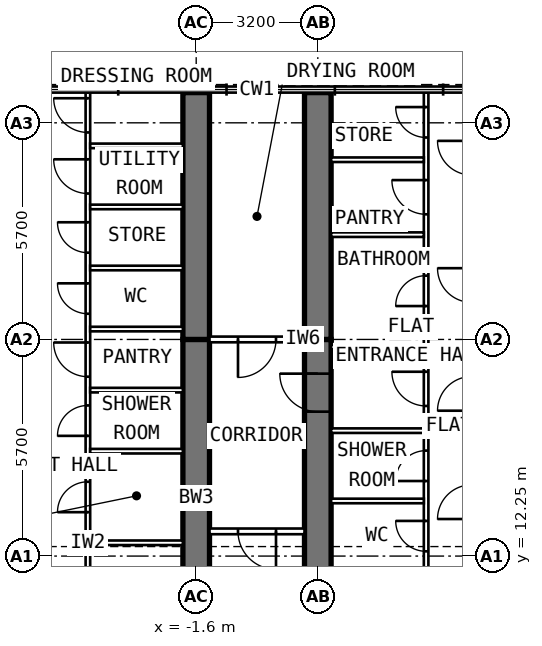
"""IFC4 building model, lengths in metres.
Left out: names, types, materials, properties, quantities, classifications, styles, units other than length and angle.
Written with IfcOpenShell. Run it as: python <this file> out.ifc"""

import sys

from ifc_helpers import new_model, si_unit, direction, frame, frame_2d, origin, place, context, subcontext, project, spatial, rectangle, extrude, element, fill, save


model = new_model("IFC4")
c1 = context("Model", 3, precision=1e-05, world=origin(), true_north=direction((0.0, 1.0)))
c2 = subcontext(c1, "Body", "Model", "MODEL_VIEW")
j1 = project(units=[si_unit("LENGTHUNIT", "METRE"), si_unit("PLANEANGLEUNIT", "RADIAN")], contexts=[c1])
p1 = place(None, origin())
s1 = spatial("IfcSite", under=j1, at=p1, CompositionType="ELEMENT")
p2 = place(p1, origin())
s2 = spatial("IfcBuilding", under=s1, at=p2, CompositionType="ELEMENT")
p3 = place(p2, frame((0.0, 0.0, 289.0)))
s3 = spatial("IfcBuildingStorey", under=s2, at=p3, CompositionType="ELEMENT", Elevation=289.0)
p4 = place(p3, frame((-1.6, 9.6, 0.0), z_axis=(0.0, 0.0, 1.0), x_axis=(0.0, 1.0, 0.0)))
e1 = element("IfcWall", 1, at=p4, inside=s3, PredefinedType="SHEAR", context=c2, shape_type="SweptSolid", body=[
    extrude(rectangle(XDim=8.35, YDim=0.7, at=frame_2d((4.175, 0.0))), origin(), (0.0, 0.0, 1.0), 3.6),
])
p5 = place(p4, frame((1.3, 0.0, 0.0)))
e2 = element("IfcOpeningElement", 2, at=p5, cuts=e1, PredefinedType="OPENING", context=c2, shape_type="SweptSolid", body=[
    extrude(rectangle(XDim=1.0, YDim=2.1, at=frame_2d((0.5, 1.05))), frame((0.0, 0.362, 0.0), z_axis=(0.0, -1.0, 0.0), x_axis=(1.0, 0.0, 0.0)), (0.0, 0.0, 1.0), 0.724),
])
p6 = place(p3, frame((-1.6, 17.95, 0.0), z_axis=(0.0, 0.0, 1.0), x_axis=(0.0, 1.0, 0.0)))
e3 = element("IfcWall", 3, at=p6, inside=s3, PredefinedType="SHEAR", context=c2, shape_type="SweptSolid", body=[
    extrude(rectangle(XDim=6.495, YDim=0.7, at=frame_2d((3.248, 0.0))), origin(), (0.0, 0.0, 1.0), 3.6),
])
p7 = place(p3, frame((1.6, 9.6, 0.0), z_axis=(0.0, 0.0, 1.0), x_axis=(0.0, 1.0, 0.0)))
e4 = element("IfcWall", 4, at=p7, inside=s3, PredefinedType="SHEAR", context=c2, shape_type="SweptSolid", body=[
    extrude(rectangle(XDim=8.35, YDim=0.7, at=frame_2d((4.175, 0.0))), origin(), (0.0, 0.0, 1.0), 3.6),
])
p8 = place(p7, frame((6.45, 0.0, 0.0)))
e5 = element("IfcOpeningElement", 5, at=p8, cuts=e4, PredefinedType="OPENING", context=c2, shape_type="SweptSolid", body=[
    extrude(rectangle(XDim=1.0, YDim=2.1, at=frame_2d((0.5, 1.05))), frame((0.0, 0.362, 0.0), z_axis=(0.0, -1.0, 0.0), x_axis=(1.0, 0.0, 0.0)), (0.0, 0.0, 1.0), 0.724),
])
p9 = place(p3, frame((1.6, 17.95, 0.0), z_axis=(0.0, 0.0, 1.0), x_axis=(0.0, 1.0, 0.0)))
e6 = element("IfcWall", 6, at=p9, inside=s3, PredefinedType="SHEAR", context=c2, shape_type="SweptSolid", body=[
    extrude(rectangle(XDim=6.495, YDim=0.7, at=frame_2d((3.248, 0.0))), origin(), (0.0, 0.0, 1.0), 3.6),
])
p10 = place(p3, frame((-4.45, 9.85, 0.0), z_axis=(0.0, 0.0, 1.0), x_axis=(0.0, 1.0, 0.0)))
e7 = element("IfcWall", 7, at=p10, inside=s3, PredefinedType="PARTITIONING", context=c2, shape_type="SweptSolid", body=[
    extrude(rectangle(XDim=14.595, YDim=0.12, at=frame_2d((7.297, 0.0))), origin(), (0.0, 0.0, 1.0), 3.35),
])
p11 = place(p10, frame((1.0, 0.0, 0.0)))
e8 = element("IfcOpeningElement", 8, at=p11, cuts=e7, PredefinedType="OPENING", context=c2, shape_type="SweptSolid", body=[
    extrude(rectangle(XDim=0.9, YDim=2.1, at=frame_2d((0.45, 1.05))), frame((0.0, 0.072, 0.0), z_axis=(0.0, -1.0, 0.0), x_axis=(1.0, 0.0, 0.0)), (0.0, 0.0, 1.0), 0.144),
])
p12 = place(p10, frame((3.555, 0.0, 0.0)))
e9 = element("IfcOpeningElement", 9, at=p12, cuts=e7, PredefinedType="OPENING", context=c2, shape_type="SweptSolid", body=[
    extrude(rectangle(XDim=0.8, YDim=2.1, at=frame_2d((0.4, 1.05))), frame((0.0, 0.072, 0.0), z_axis=(0.0, -1.0, 0.0), x_axis=(1.0, 0.0, 0.0)), (0.0, 0.0, 1.0), 0.144),
])
p13 = place(p10, frame((5.563, 0.0, 0.0)))
e10 = element("IfcOpeningElement", 10, at=p13, cuts=e7, PredefinedType="OPENING", context=c2, shape_type="SweptSolid", body=[
    extrude(rectangle(XDim=0.8, YDim=2.1, at=frame_2d((0.4, 1.05))), frame((0.0, 0.072, 0.0), z_axis=(0.0, -1.0, 0.0), x_axis=(1.0, 0.0, 0.0)), (0.0, 0.0, 1.0), 0.144),
])
p14 = place(p10, frame((7.12, 0.0, 0.0)))
e11 = element("IfcOpeningElement", 11, at=p14, cuts=e7, PredefinedType="OPENING", context=c2, shape_type="SweptSolid", body=[
    extrude(rectangle(XDim=0.9, YDim=2.1, at=frame_2d((0.45, 1.05))), frame((0.0, 0.072, 0.0), z_axis=(0.0, -1.0, 0.0), x_axis=(1.0, 0.0, 0.0)), (0.0, 0.0, 1.0), 0.144),
])
p15 = place(p10, frame((8.777, 0.0, 0.0)))
e12 = element("IfcOpeningElement", 12, at=p15, cuts=e7, PredefinedType="OPENING", context=c2, shape_type="SweptSolid", body=[
    extrude(rectangle(XDim=0.8, YDim=2.1, at=frame_2d((0.4, 1.05))), frame((0.0, 0.072, 0.0), z_axis=(0.0, -1.0, 0.0), x_axis=(1.0, 0.0, 0.0)), (0.0, 0.0, 1.0), 0.144),
])
p16 = place(p10, frame((10.383, 0.0, 0.0)))
e13 = element("IfcOpeningElement", 13, at=p16, cuts=e7, PredefinedType="OPENING", context=c2, shape_type="SweptSolid", body=[
    extrude(rectangle(XDim=0.8, YDim=2.1, at=frame_2d((0.4, 1.05))), frame((0.0, 0.072, 0.0), z_axis=(0.0, -1.0, 0.0), x_axis=(1.0, 0.0, 0.0)), (0.0, 0.0, 1.0), 0.144),
])
p17 = place(p10, frame((11.94, 0.0, 0.0)))
e14 = element("IfcOpeningElement", 14, at=p17, cuts=e7, PredefinedType="OPENING", context=c2, shape_type="SweptSolid", body=[
    extrude(rectangle(XDim=0.9, YDim=2.1, at=frame_2d((0.45, 1.05))), frame((0.0, 0.072, 0.0), z_axis=(0.0, -1.0, 0.0), x_axis=(1.0, 0.0, 0.0)), (0.0, 0.0, 1.0), 0.144),
])
p18 = place(p10, frame((13.547, 0.0, 0.0)))
e15 = element("IfcOpeningElement", 15, at=p18, cuts=e7, PredefinedType="OPENING", context=c2, shape_type="SweptSolid", body=[
    extrude(rectangle(XDim=0.9, YDim=2.1, at=frame_2d((0.45, 1.05))), frame((0.0, 0.072, 0.0), z_axis=(0.0, -1.0, 0.0), x_axis=(1.0, 0.0, 0.0)), (0.0, 0.0, 1.0), 0.144),
])
p19 = place(p3, frame((-1.95, 12.6, 0.0), z_axis=(0.0, 0.0, 1.0), x_axis=(-1.0, 0.0, 0.0)))
e16 = element("IfcWall", 16, at=p19, inside=s3, PredefinedType="PARTITIONING", context=c2, shape_type="SweptSolid", body=[
    extrude(rectangle(XDim=2.44, YDim=0.12, at=frame_2d((1.22, 0.0))), origin(), (0.0, 0.0, 1.0), 2.45),
])
for number, where, z_axis, x_axis in (
    (17, (-1.95, 15.01, 0.0), (0.0, 0.0, 1.0), (-1.0, 0.0, 0.0)),
    (18, (-1.95, 16.617, 0.0), (0.0, 0.0, 1.0), (-1.0, 0.0, 0.0)),
):
    element("IfcWall", number, at=place(p3, frame(where, z_axis=z_axis, x_axis=x_axis)), inside=s3, PredefinedType="PARTITIONING", context=c2, shape_type="SweptSolid", body=[
        extrude(rectangle(XDim=2.44, YDim=0.12, at=frame_2d((1.22, 0.0))), origin(), (0.0, 0.0, 1.0), 3.35),
    ])
p20 = place(p3, frame((-1.95, 18.223, 0.0), z_axis=(0.0, 0.0, 1.0), x_axis=(-1.0, 0.0, 0.0)))
e19 = element("IfcWall", 19, at=p20, inside=s3, PredefinedType="PARTITIONING", context=c2, shape_type="SweptSolid", body=[
    extrude(rectangle(XDim=2.44, YDim=0.12, at=frame_2d((1.22, 0.0))), origin(), (0.0, 0.0, 1.0), 2.45),
])
for number, where, z_axis, x_axis in (
    (20, (-1.95, 19.83, 0.0), (0.0, 0.0, 1.0), (-1.0, 0.0, 0.0)),
    (21, (-1.95, 21.437, 0.0), (0.0, 0.0, 1.0), (-1.0, 0.0, 0.0)),
    (22, (-1.95, 23.043, 0.0), (0.0, 0.0, 1.0), (-1.0, 0.0, 0.0)),
):
    element("IfcWall", number, at=place(p3, frame(where, z_axis=z_axis, x_axis=x_axis)), inside=s3, PredefinedType="PARTITIONING", context=c2, shape_type="SweptSolid", body=[
        extrude(rectangle(XDim=2.44, YDim=0.12, at=frame_2d((1.22, 0.0))), origin(), (0.0, 0.0, 1.0), 3.35),
    ])
p21 = place(p3, frame((4.45, 9.85, 0.0), z_axis=(0.0, 0.0, 1.0), x_axis=(0.0, 1.0, 0.0)))
e23 = element("IfcWall", 23, at=p21, inside=s3, PredefinedType="PARTITIONING", context=c2, shape_type="SweptSolid", body=[
    extrude(rectangle(XDim=14.595, YDim=0.12, at=frame_2d((7.297, 0.0))), origin(), (0.0, 0.0, 1.0), 3.35),
])
p22 = place(p21, frame((0.625, 0.0, 0.0)))
e24 = element("IfcOpeningElement", 24, at=p22, cuts=e23, PredefinedType="OPENING", context=c2, shape_type="SweptSolid", body=[
    extrude(rectangle(XDim=0.9, YDim=2.1, at=frame_2d((0.45, 1.05))), frame((0.0, 0.072, 0.0), z_axis=(0.0, -1.0, 0.0), x_axis=(1.0, 0.0, 0.0)), (0.0, 0.0, 1.0), 0.144),
])
p23 = place(p21, frame((2.525, 0.0, 0.0)))
e25 = element("IfcOpeningElement", 25, at=p23, cuts=e23, PredefinedType="OPENING", context=c2, shape_type="SweptSolid", body=[
    extrude(rectangle(XDim=0.8, YDim=2.1, at=frame_2d((0.4, 1.05))), frame((0.0, 0.072, 0.0), z_axis=(0.0, -1.0, 0.0), x_axis=(1.0, 0.0, 0.0)), (0.0, 0.0, 1.0), 0.144),
])
p24 = place(p21, frame((4.375, 0.0, 0.0)))
e26 = element("IfcOpeningElement", 26, at=p24, cuts=e23, PredefinedType="OPENING", context=c2, shape_type="SweptSolid", body=[
    extrude(rectangle(XDim=0.8, YDim=2.1, at=frame_2d((0.4, 1.05))), frame((0.0, 0.072, 0.0), z_axis=(0.0, -1.0, 0.0), x_axis=(1.0, 0.0, 0.0)), (0.0, 0.0, 1.0), 0.144),
])
p25 = place(p21, frame((6.35, 0.0, 0.0)))
e27 = element("IfcOpeningElement", 27, at=p25, cuts=e23, PredefinedType="OPENING", context=c2, shape_type="SweptSolid", body=[
    extrude(rectangle(XDim=0.9, YDim=2.1, at=frame_2d((0.45, 1.05))), frame((0.0, 0.072, 0.0), z_axis=(0.0, -1.0, 0.0), x_axis=(1.0, 0.0, 0.0)), (0.0, 0.0, 1.0), 0.144),
])
p26 = place(p21, frame((8.979, 0.0, 0.0)))
e28 = element("IfcOpeningElement", 28, at=p26, cuts=e23, PredefinedType="OPENING", context=c2, shape_type="SweptSolid", body=[
    extrude(rectangle(XDim=0.8, YDim=2.1, at=frame_2d((0.4, 1.05))), frame((0.0, 0.072, 0.0), z_axis=(0.0, -1.0, 0.0), x_axis=(1.0, 0.0, 0.0)), (0.0, 0.0, 1.0), 0.144),
])
p27 = place(p21, frame((11.393, 0.0, 0.0)))
e29 = element("IfcOpeningElement", 29, at=p27, cuts=e23, PredefinedType="OPENING", context=c2, shape_type="SweptSolid", body=[
    extrude(rectangle(XDim=0.9, YDim=2.1, at=frame_2d((0.45, 1.05))), frame((0.0, 0.072, 0.0), z_axis=(0.0, -1.0, 0.0), x_axis=(1.0, 0.0, 0.0)), (0.0, 0.0, 1.0), 0.144),
])
p28 = place(p21, frame((13.414, 0.0, 0.0)))
e30 = element("IfcOpeningElement", 30, at=p28, cuts=e23, PredefinedType="OPENING", context=c2, shape_type="SweptSolid", body=[
    extrude(rectangle(XDim=0.8, YDim=2.1, at=frame_2d((0.4, 1.05))), frame((0.0, 0.072, 0.0), z_axis=(0.0, -1.0, 0.0), x_axis=(1.0, 0.0, 0.0)), (0.0, 0.0, 1.0), 0.144),
])
for number, where, z_axis, x_axis in (
    (31, (1.95, 13.7, 0.0), (0.0, 0.0, 1.0), (1.0, 0.0, 0.0)),
    (32, (1.95, 15.55, 0.0), (0.0, 0.0, 1.0), (1.0, 0.0, 0.0)),
):
    element("IfcWall", number, at=place(p3, frame(where, z_axis=z_axis, x_axis=x_axis)), inside=s3, PredefinedType="PARTITIONING", context=c2, shape_type="SweptSolid", body=[
        extrude(rectangle(XDim=2.44, YDim=0.12, at=frame_2d((1.22, 0.0))), origin(), (0.0, 0.0, 1.0), 3.35),
    ])
p29 = place(p3, frame((1.95, 17.75, 0.0), z_axis=(0.0, 0.0, 1.0), x_axis=(1.0, 0.0, 0.0)))
e33 = element("IfcWall", 33, at=p29, inside=s3, PredefinedType="PARTITIONING", context=c2, shape_type="SweptSolid", body=[
    extrude(rectangle(XDim=2.44, YDim=0.12, at=frame_2d((1.22, 0.0))), origin(), (0.0, 0.0, 1.0), 2.45),
])
for number, where, z_axis, x_axis in (
    (34, (1.95, 20.707, 0.0), (0.0, 0.0, 1.0), (1.0, 0.0, 0.0)),
    (35, (1.95, 22.678, 0.0), (0.0, 0.0, 1.0), (1.0, 0.0, 0.0)),
):
    element("IfcWall", number, at=place(p3, frame(where, z_axis=z_axis, x_axis=x_axis)), inside=s3, PredefinedType="PARTITIONING", context=c2, shape_type="SweptSolid", body=[
        extrude(rectangle(XDim=2.44, YDim=0.12, at=frame_2d((1.22, 0.0))), origin(), (0.0, 0.0, 1.0), 3.35),
    ])
p30 = place(p3, frame((1.25, 17.95, 0.0), z_axis=(0.0, 0.0, 1.0), x_axis=(-1.0, 0.0, 0.0)))
e36 = element("IfcWall", 36, at=p30, inside=s3, PredefinedType="PARTITIONING", context=c2, shape_type="SweptSolid", body=[
    extrude(rectangle(XDim=2.5, YDim=0.15, at=frame_2d((1.25, 0.0))), origin(), (0.0, 0.0, 1.0), 3.35),
])
p31 = place(p30, frame((0.75, 0.0, 0.0)))
e37 = element("IfcOpeningElement", 37, at=p31, cuts=e36, PredefinedType="OPENING", context=c2, shape_type="SweptSolid", body=[
    extrude(rectangle(XDim=1.0, YDim=2.1, at=frame_2d((0.5, 1.05))), frame((0.0, 0.087, 0.0), z_axis=(0.0, -1.0, 0.0), x_axis=(1.0, 0.0, 0.0)), (0.0, 0.0, 1.0), 0.174),
])
p32 = place(p3, frame((1.25, 12.9, 0.0), z_axis=(0.0, 0.0, 1.0), x_axis=(-1.0, 0.0, 0.0)))
e38 = element("IfcWall", 38, at=p32, inside=s3, PredefinedType="PARTITIONING", context=c2, shape_type="SweptSolid", body=[
    extrude(rectangle(XDim=2.5, YDim=0.15, at=frame_2d((1.25, 0.0))), origin(), (0.0, 0.0, 1.0), 3.35),
])
p33 = place(p32, frame((0.75, 0.0, 0.0)))
e39 = element("IfcOpeningElement", 39, at=p33, cuts=e38, PredefinedType="OPENING", context=c2, shape_type="SweptSolid", body=[
    extrude(rectangle(XDim=1.0, YDim=2.1, at=frame_2d((0.5, 1.05))), frame((0.0, 0.087, 0.0), z_axis=(0.0, -1.0, 0.0), x_axis=(1.0, 0.0, 0.0)), (0.0, 0.0, 1.0), 0.174),
])
p34 = place(p12, origin())
e40 = element("IfcDoor", 40, at=p34, inside=s3, OperationType="SINGLE_SWING_LEFT", PredefinedType="DOOR", context=c2, shape_type="SweptSolid", body=[
    extrude(rectangle(XDim=0.8, YDim=2.1, at=frame_2d((0.4, 1.05))), frame((0.0, 0.025, 0.0), z_axis=(0.0, -1.0, 0.0), x_axis=(1.0, 0.0, 0.0)), (0.0, 0.0, 1.0), 0.05),
])
fill(e9, e40)
p35 = place(p13, origin())
e41 = element("IfcDoor", 41, at=p35, inside=s3, OperationType="SINGLE_SWING_LEFT", PredefinedType="DOOR", context=c2, shape_type="SweptSolid", body=[
    extrude(rectangle(XDim=0.8, YDim=2.1, at=frame_2d((0.4, 1.05))), frame((0.0, 0.025, 0.0), z_axis=(0.0, -1.0, 0.0), x_axis=(1.0, 0.0, 0.0)), (0.0, 0.0, 1.0), 0.05),
])
fill(e10, e41)
p36 = place(p14, origin())
e42 = element("IfcDoor", 42, at=p36, inside=s3, OperationType="SINGLE_SWING_RIGHT", PredefinedType="DOOR", context=c2, shape_type="SweptSolid", body=[
    extrude(rectangle(XDim=0.9, YDim=2.1, at=frame_2d((0.45, 1.05))), frame((0.0, 0.025, 0.0), z_axis=(0.0, -1.0, 0.0), x_axis=(1.0, 0.0, 0.0)), (0.0, 0.0, 1.0), 0.05),
])
fill(e11, e42)
p37 = place(p15, origin())
e43 = element("IfcDoor", 43, at=p37, inside=s3, OperationType="SINGLE_SWING_RIGHT", PredefinedType="DOOR", context=c2, shape_type="SweptSolid", body=[
    extrude(rectangle(XDim=0.8, YDim=2.1, at=frame_2d((0.4, 1.05))), frame((0.0, 0.025, 0.0), z_axis=(0.0, -1.0, 0.0), x_axis=(1.0, 0.0, 0.0)), (0.0, 0.0, 1.0), 0.05),
])
fill(e12, e43)
p38 = place(p16, origin())
e44 = element("IfcDoor", 44, at=p38, inside=s3, OperationType="SINGLE_SWING_RIGHT", PredefinedType="DOOR", context=c2, shape_type="SweptSolid", body=[
    extrude(rectangle(XDim=0.8, YDim=2.1, at=frame_2d((0.4, 1.05))), frame((0.0, 0.025, 0.0), z_axis=(0.0, -1.0, 0.0), x_axis=(1.0, 0.0, 0.0)), (0.0, 0.0, 1.0), 0.05),
])
fill(e13, e44)
p39 = place(p17, origin())
e45 = element("IfcDoor", 45, at=p39, inside=s3, OperationType="SINGLE_SWING_RIGHT", PredefinedType="DOOR", context=c2, shape_type="SweptSolid", body=[
    extrude(rectangle(XDim=0.9, YDim=2.1, at=frame_2d((0.45, 1.05))), frame((0.0, 0.025, 0.0), z_axis=(0.0, -1.0, 0.0), x_axis=(1.0, 0.0, 0.0)), (0.0, 0.0, 1.0), 0.05),
])
fill(e14, e45)
p40 = place(p18, origin())
e46 = element("IfcDoor", 46, at=p40, inside=s3, OperationType="SINGLE_SWING_RIGHT", PredefinedType="DOOR", context=c2, shape_type="SweptSolid", body=[
    extrude(rectangle(XDim=0.9, YDim=2.1, at=frame_2d((0.45, 1.05))), frame((0.0, 0.025, 0.0), z_axis=(0.0, -1.0, 0.0), x_axis=(1.0, 0.0, 0.0)), (0.0, 0.0, 1.0), 0.05),
])
fill(e15, e46)
p41 = place(p8, origin())
e47 = element("IfcDoor", 47, at=p41, inside=s3, OperationType="SINGLE_SWING_RIGHT", PredefinedType="DOOR", context=c2, shape_type="SweptSolid", body=[
    extrude(rectangle(XDim=1.0, YDim=2.1, at=frame_2d((0.5, 1.05))), frame((0.0, 0.1, 0.0), z_axis=(0.0, -1.0, 0.0), x_axis=(1.0, 0.0, 0.0)), (0.0, 0.0, 1.0), 0.2),
])
fill(e5, e47)
p42 = place(p23, origin())
e48 = element("IfcDoor", 48, at=p42, inside=s3, OperationType="SINGLE_SWING_RIGHT", PredefinedType="DOOR", context=c2, shape_type="SweptSolid", body=[
    extrude(rectangle(XDim=0.8, YDim=2.1, at=frame_2d((0.4, 1.05))), frame((0.0, 0.025, 0.0), z_axis=(0.0, -1.0, 0.0), x_axis=(1.0, 0.0, 0.0)), (0.0, 0.0, 1.0), 0.05),
])
fill(e25, e48)
p43 = place(p24, origin())
e49 = element("IfcDoor", 49, at=p43, inside=s3, OperationType="SINGLE_SWING_LEFT", PredefinedType="DOOR", context=c2, shape_type="SweptSolid", body=[
    extrude(rectangle(XDim=0.8, YDim=2.1, at=frame_2d((0.4, 1.05))), frame((0.0, 0.025, 0.0), z_axis=(0.0, -1.0, 0.0), x_axis=(1.0, 0.0, 0.0)), (0.0, 0.0, 1.0), 0.05),
])
fill(e26, e49)
p44 = place(p25, origin())
e50 = element("IfcDoor", 50, at=p44, inside=s3, OperationType="SINGLE_SWING_RIGHT", PredefinedType="DOOR", context=c2, shape_type="SweptSolid", body=[
    extrude(rectangle(XDim=0.9, YDim=2.1, at=frame_2d((0.45, 1.05))), frame((0.0, 0.025, 0.0), z_axis=(0.0, -1.0, 0.0), x_axis=(1.0, 0.0, 0.0)), (0.0, 0.0, 1.0), 0.05),
])
fill(e27, e50)
p45 = place(p26, origin())
e51 = element("IfcDoor", 51, at=p45, inside=s3, OperationType="SINGLE_SWING_LEFT", PredefinedType="DOOR", context=c2, shape_type="SweptSolid", body=[
    extrude(rectangle(XDim=0.8, YDim=2.1, at=frame_2d((0.4, 1.05))), frame((0.0, 0.025, 0.0), z_axis=(0.0, -1.0, 0.0), x_axis=(1.0, 0.0, 0.0)), (0.0, 0.0, 1.0), 0.05),
])
fill(e28, e51)
p46 = place(p27, origin())
e52 = element("IfcDoor", 52, at=p46, inside=s3, OperationType="SINGLE_SWING_RIGHT", PredefinedType="DOOR", context=c2, shape_type="SweptSolid", body=[
    extrude(rectangle(XDim=0.9, YDim=2.1, at=frame_2d((0.45, 1.05))), frame((0.0, 0.025, 0.0), z_axis=(0.0, -1.0, 0.0), x_axis=(1.0, 0.0, 0.0)), (0.0, 0.0, 1.0), 0.05),
])
fill(e29, e52)
p47 = place(p28, origin())
e53 = element("IfcDoor", 53, at=p47, inside=s3, OperationType="SINGLE_SWING_RIGHT", PredefinedType="DOOR", context=c2, shape_type="SweptSolid", body=[
    extrude(rectangle(XDim=0.8, YDim=2.1, at=frame_2d((0.4, 1.05))), frame((0.0, 0.025, 0.0), z_axis=(0.0, -1.0, 0.0), x_axis=(1.0, 0.0, 0.0)), (0.0, 0.0, 1.0), 0.05),
])
fill(e30, e53)
p48 = place(p31, origin())
e54 = element("IfcDoor", 54, at=p48, inside=s3, OperationType="SINGLE_SWING_RIGHT", PredefinedType="DOOR", context=c2, shape_type="SweptSolid", body=[
    extrude(rectangle(XDim=1.0, YDim=2.1, at=frame_2d((0.5, 1.05))), frame((0.0, 0.025, 0.0), z_axis=(0.0, -1.0, 0.0), x_axis=(1.0, 0.0, 0.0)), (0.0, 0.0, 1.0), 0.05),
])
fill(e37, e54)
p49 = place(p33, origin())
e55 = element("IfcDoor", 55, at=p49, inside=s3, OperationType="SINGLE_SWING_LEFT", PredefinedType="DOOR", context=c2, shape_type="SweptSolid", body=[
    extrude(rectangle(XDim=1.0, YDim=2.1, at=frame_2d((0.5, 1.05))), frame((0.0, 0.025, 0.0), z_axis=(0.0, -1.0, 0.0), x_axis=(1.0, 0.0, 0.0)), (0.0, 0.0, 1.0), 0.05),
])
fill(e39, e55)
save(model, sys.argv[1])
